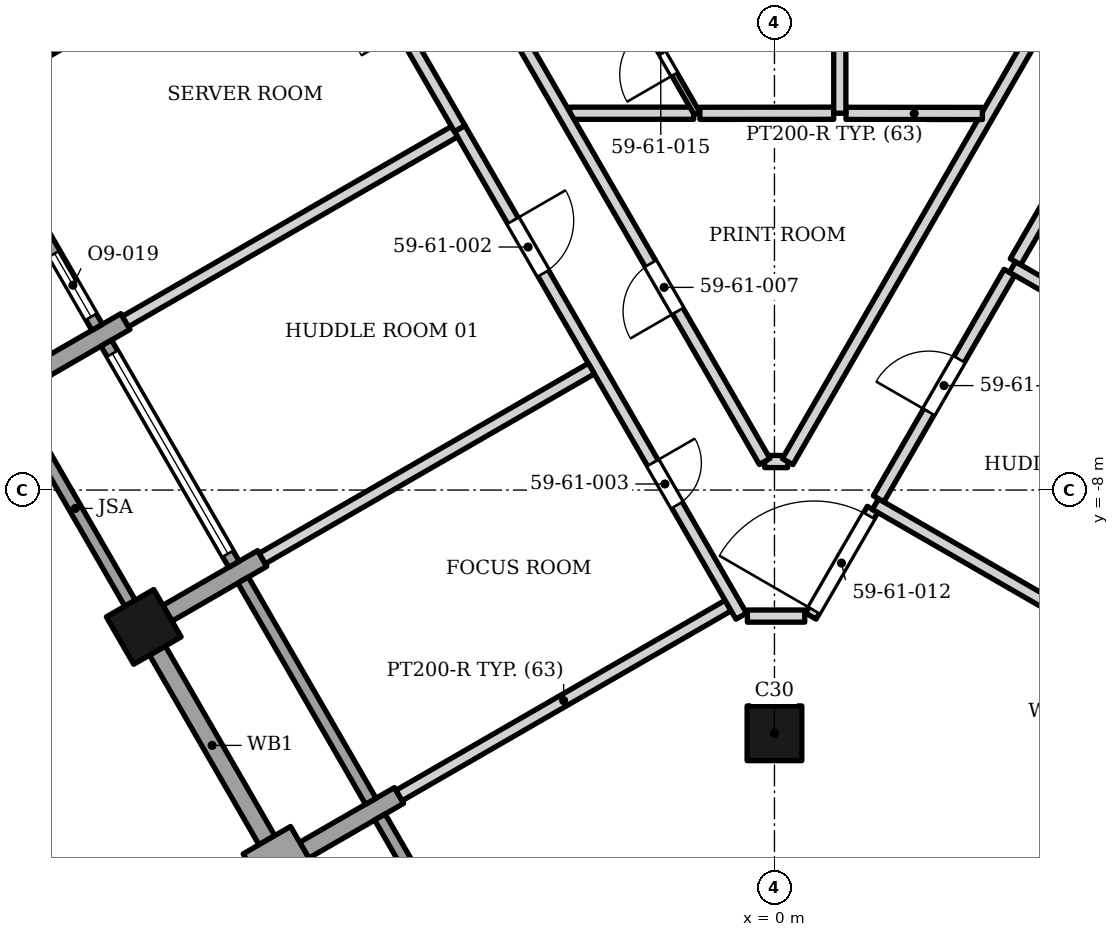
"""IFC4 building model, lengths in metres.
Left out: names, types, materials, properties, quantities, classifications, styles, units other than length and angle.
Written with IfcOpenShell. Run it as: python <this file> out.ifc"""

import sys

from ifc_helpers import new_model, si_unit, direction, frame, frame_2d, origin, origin_2d, place, context, subcontext, project, spatial, rectangle, extrude, element, fill, save


model = new_model("IFC4")
c1 = context("Model", 3, precision=1e-05, world=origin(), true_north=direction((0.0, 1.0)))
c2 = subcontext(c1, "Body", "Model", "MODEL_VIEW")
j1 = project(units=[si_unit("LENGTHUNIT", "METRE"), si_unit("PLANEANGLEUNIT", "RADIAN")], contexts=[c1])
p1 = place(None, origin())
s1 = spatial("IfcSite", under=j1, at=p1, CompositionType="ELEMENT")
p2 = place(p1, origin())
s2 = spatial("IfcBuilding", under=s1, at=p2, CompositionType="ELEMENT")
p3 = place(p2, frame((0.0, 0.0, 248.2)))
s3 = spatial("IfcBuildingStorey", under=s2, at=p3, CompositionType="ELEMENT", Elevation=248.2)
for number, where, z_axis, x_axis in (
    (1, (0.0, -12.0, 0.0), (0.0, 0.0, 1.0), (1.0, 0.0, 0.0)),
    (2, (-10.373, -10.25, 0.0), (0.0, 0.0, 1.0), (0.5, -0.866, 0.0)),
):
    element("IfcColumn", number, at=place(p3, frame(where, z_axis=z_axis, x_axis=x_axis)), inside=s3, PredefinedType="COLUMN", context=c2, shape_type="SweptSolid", body=[
        extrude(rectangle(XDim=0.9, YDim=0.9, at=origin_2d()), origin(), (0.0, 0.0, 1.0), 3.9),
    ])
for number, where, z_axis, x_axis in (
    (3, (-12.233, -6.128, 0.0), (0.0, 0.0, 1.0), (0.866, 0.5, 0.0)),
    (4, (-9.983, -10.025, 0.0), (0.0, 0.0, 1.0), (0.866, 0.5, 0.0)),
):
    element("IfcWall", number, at=place(p3, frame(where, z_axis=z_axis, x_axis=x_axis)), inside=s3, PredefinedType="SOLIDWALL", context=c2, shape_type="SweptSolid", body=[
        extrude(rectangle(XDim=1.8, YDim=0.3, at=frame_2d((0.9, 0.0))), origin(), (0.0, 0.0, 1.0), 3.0),
    ])
p4 = place(p3, frame((-7.898, -14.537, 0.0), z_axis=(0.0, 0.0, 1.0), x_axis=(-0.499902469156, 0.866081705922, 0.0)))
e5 = element("IfcWall", 5, at=p4, inside=s3, PredefinedType="SOLIDWALL", context=c2, shape_type="SweptSolid", body=[
    extrude(rectangle(XDim=0.9, YDim=0.9, at=frame_2d((0.45, 0.0))), origin(), (0.0, 0.0, 1.0), 3.0),
])
p5 = place(p3, frame((-6.174, -13.022, 0.0), z_axis=(0.0, 0.0, 1.0), x_axis=(-0.865989075817, -0.500062916607, 0.0)))
e6 = element("IfcWall", 6, at=p5, inside=s3, PredefinedType="SOLIDWALL", context=c2, shape_type="SweptSolid", body=[
    extrude(rectangle(XDim=1.8, YDim=0.3, at=frame_2d((0.9, 0.0))), origin(), (0.0, 0.0, 1.0), 3.0),
])
p6 = place(p3, frame((-13.239, -1.686, 0.0), z_axis=(0.0, 0.0, 1.0), x_axis=(0.500002543286, -0.866023935413, 0.0)))
e7 = element("IfcWall", 7, at=p6, inside=s3, PredefinedType="ELEMENTEDWALL", context=c2, shape_type="SweptSolid", body=[
    extrude(rectangle(XDim=4.2, YDim=0.2, at=frame_2d((2.1, 0.0))), origin(), (0.0, 0.0, 1.0), 3.0),
])
p7 = place(p6, frame((0.2, 0.0, 0.45)))
e8 = element("IfcOpeningElement", 8, at=p7, cuts=e7, PredefinedType="OPENING", context=c2, shape_type="SweptSolid", body=[
    extrude(rectangle(XDim=2.4, YDim=2.25, at=frame_2d((1.2, 1.125))), frame((0.0, 0.11, 0.0), z_axis=(0.0, -1.0, 0.0), x_axis=(1.0, 0.0, 0.0)), (0.0, 0.0, 1.0), 0.22),
])
p8 = place(p6, frame((2.8, 0.0, 0.0)))
e9 = element("IfcOpeningElement", 9, at=p8, cuts=e7, PredefinedType="OPENING", context=c2, shape_type="SweptSolid", body=[
    extrude(rectangle(XDim=1.2, YDim=2.7, at=frame_2d((0.6, 1.35))), frame((0.0, 0.11, 0.0), z_axis=(0.0, -1.0, 0.0), x_axis=(1.0, 0.0, 0.0)), (0.0, 0.0, 1.0), 0.22),
])
p9 = place(p3, frame((-12.398, -6.743, 0.0), z_axis=(0.0, 0.0, 1.0), x_axis=(0.500012057535, -0.866018442252, 0.0)))
e10 = element("IfcWall", 10, at=p9, inside=s3, PredefinedType="SOLIDWALL", context=c2, shape_type="SweptSolid", body=[
    extrude(rectangle(XDim=3.6, YDim=0.2, at=frame_2d((1.8, 0.0))), origin(), (0.0, 0.0, 1.0), 3.0),
])
p10 = place(p3, frame((-10.989, -5.583, 0.0), z_axis=(0.0, 0.0, 1.0), x_axis=(0.500027713859, -0.866009402589, 0.0)))
e11 = element("IfcWall", 11, at=p10, inside=s3, PredefinedType="ELEMENTEDWALL", context=c2, shape_type="SweptSolid", body=[
    extrude(rectangle(XDim=4.2, YDim=0.2, at=frame_2d((2.1, 0.0))), origin(), (0.0, 0.0, 1.0), 3.0),
])
p11 = place(p10, frame((0.2, 0.0, 0.45)))
e12 = element("IfcOpeningElement", 12, at=p11, cuts=e11, PredefinedType="OPENING", context=c2, shape_type="SweptSolid", body=[
    extrude(rectangle(XDim=3.8, YDim=2.25, at=frame_2d((1.9, 1.125))), frame((0.0, 0.11, 0.0), z_axis=(0.0, -1.0, 0.0), x_axis=(1.0, 0.0, 0.0)), (0.0, 0.0, 1.0), 0.22),
])
p12 = place(p3, frame((-10.148, -10.64, 0.0), z_axis=(0.0, 0.0, 1.0), x_axis=(0.500012057535, -0.866018442252, 0.0)))
e13 = element("IfcWall", 13, at=p12, inside=s3, PredefinedType="SOLIDWALL", context=c2, shape_type="SweptSolid", body=[
    extrude(rectangle(XDim=3.6, YDim=0.3, at=frame_2d((1.8, 0.0))), origin(), (0.0, 0.0, 1.0), 2.95),
])
p13 = place(p3, frame((-8.739, -9.48, 0.0), z_axis=(0.0, 0.0, 1.0), x_axis=(0.500027713859, -0.866009402589, 0.0)))
e14 = element("IfcWall", 14, at=p13, inside=s3, PredefinedType="ELEMENTEDWALL", context=c2, shape_type="SweptSolid", body=[
    extrude(rectangle(XDim=4.2, YDim=0.2, at=frame_2d((2.1, 0.0))), origin(), (0.0, 0.0, 1.0), 2.95),
])
p14 = place(p3, frame((-6.489, -13.377, 0.0), z_axis=(0.0, 0.0, 1.0), x_axis=(0.500002543286, -0.866023935413, 0.0)))
e15 = element("IfcWall", 15, at=p14, inside=s3, PredefinedType="ELEMENTEDWALL", context=c2, shape_type="SweptSolid", body=[
    extrude(rectangle(XDim=4.2, YDim=0.2, at=frame_2d((2.1, 0.0))), origin(), (0.0, 0.0, 1.0), 3.0),
])
p15 = place(p3, frame((-6.174, -13.023, 0.0), z_axis=(0.0, 0.0, 1.0), x_axis=(0.866143960209, 0.499794598003, 0.0)))
e16 = element("IfcWall", 16, at=p15, inside=s3, PredefinedType="PARTITIONING", context=c2, shape_type="SweptSolid", body=[
    extrude(rectangle(XDim=6.25, YDim=0.2, at=frame_2d((3.125, 0.0))), origin(), (0.0, 0.0, 1.0), 2.884),
])
p16 = place(p3, frame((-5.177, -2.054, 0.0), z_axis=(0.0, 0.0, 1.0), x_axis=(0.499987206771, -0.866032789833, 0.0)))
e17 = element("IfcWall", 17, at=p16, inside=s3, PredefinedType="PARTITIONING", context=c2, shape_type="SweptSolid", body=[
    extrude(rectangle(XDim=9.26, YDim=0.2, at=frame_2d((4.63, 0.0))), origin(), (0.0, 0.0, 1.0), 2.884),
])
p17 = place(p16, frame((1.75, 0.0, 0.0)))
e18 = element("IfcOpeningElement", 18, at=p17, cuts=e17, PredefinedType="OPENING", context=c2, shape_type="SweptSolid", body=[
    extrude(rectangle(XDim=1.0, YDim=2.1, at=frame_2d((0.5, 1.05))), frame((0.0, 0.11, 0.0), z_axis=(0.0, -1.0, 0.0), x_axis=(1.0, 0.0, 0.0)), (0.0, 0.0, 1.0), 0.22),
])
p18 = place(p16, frame((6.35, 0.0, 0.0)))
e19 = element("IfcOpeningElement", 19, at=p18, cuts=e17, PredefinedType="OPENING", context=c2, shape_type="SweptSolid", body=[
    extrude(rectangle(XDim=0.8, YDim=2.1, at=frame_2d((0.4, 1.05))), frame((0.0, 0.11, 0.0), z_axis=(0.0, -1.0, 0.0), x_axis=(1.0, 0.0, 0.0)), (0.0, 0.0, 1.0), 0.22),
])
p19 = place(p3, frame((-0.445, -10.073, 0.0), z_axis=(0.0, 0.0, 1.0), x_axis=(1.0, 0.0, 0.0)))
e20 = element("IfcWall", 20, at=p19, inside=s3, PredefinedType="PARTITIONING", context=c2, shape_type="SweptSolid", body=[
    extrude(rectangle(XDim=0.943, YDim=0.2, at=frame_2d((0.472, 0.0))), origin(), (0.0, 0.0, 1.0), 3.73),
])
p20 = place(p3, frame((0.598, -10.073, 0.0), z_axis=(0.0, 0.0, 1.0), x_axis=(0.500670744682, 0.865637802675, 0.0)))
e21 = element("IfcWall", 21, at=p20, inside=s3, PredefinedType="PARTITIONING", context=c2, shape_type="SweptSolid", body=[
    extrude(rectangle(XDim=2.028, YDim=0.2, at=frame_2d((1.014, 0.0))), origin(), (0.0, 0.0, 1.0), 3.73),
])
p21 = place(p20, frame((0.107, 0.0, 0.0)))
e22 = element("IfcOpeningElement", 22, at=p21, cuts=e21, PredefinedType="OPENING", context=c2, shape_type="SweptSolid", body=[
    extrude(rectangle(XDim=1.8, YDim=2.4, at=frame_2d((0.9, 1.2))), frame((0.0, 0.11, 0.0), z_axis=(0.0, -1.0, 0.0), x_axis=(1.0, 0.0, 0.0)), (0.0, 0.0, 1.0), 0.22),
])
p22 = place(p3, frame((1.661, -8.231, 0.0), z_axis=(0.0, 0.0, 1.0), x_axis=(0.866162357873, -0.499762713499, 0.0)))
e23 = element("IfcWall", 23, at=p22, inside=s3, PredefinedType="PARTITIONING", context=c2, shape_type="SweptSolid", body=[
    extrude(rectangle(XDim=5.95, YDim=0.2, at=frame_2d((2.975, 0.0))), origin(), (0.0, 0.0, 1.0), 2.884),
])
p23 = place(p3, frame((-0.161, -7.53, 0.0), z_axis=(0.0, 0.0, 1.0), x_axis=(0.999986611797, -0.005174574964, 0.0)))
e24 = element("IfcWall", 24, at=p23, inside=s3, PredefinedType="PARTITIONING", context=c2, shape_type="SweptSolid", body=[
    extrude(rectangle(XDim=0.377, YDim=0.2, at=frame_2d((0.189, 0.0))), origin(), (0.0, 0.0, 1.0), 3.73),
])
p24 = place(p3, frame((0.217, -7.532, 0.0), z_axis=(0.0, 0.0, 1.0), x_axis=(0.499766665369, 0.866160077691, 0.0)))
e25 = element("IfcWall", 25, at=p24, inside=s3, PredefinedType="PARTITIONING", context=c2, shape_type="SweptSolid", body=[
    extrude(rectangle(XDim=12.588, YDim=0.2, at=frame_2d((6.294, 0.0))), origin(), (0.0, 0.0, 1.0), 2.884),
])
p25 = place(p24, frame((9.201, 0.0, 0.0)))
e26 = element("IfcOpeningElement", 26, at=p25, cuts=e25, PredefinedType="OPENING", context=c2, shape_type="SweptSolid", body=[
    extrude(rectangle(XDim=0.8, YDim=2.1, at=frame_2d((0.4, 1.05))), frame((0.0, 0.11, 0.0), z_axis=(0.0, -1.0, 0.0), x_axis=(1.0, 0.0, 0.0)), (0.0, 0.0, 1.0), 0.22),
])
p26 = place(p3, frame((-8.424, -9.125, 0.0), z_axis=(0.0, 0.0, 1.0), x_axis=(0.866180383398, 0.499731471309, 0.0)))
e27 = element("IfcWall", 27, at=p26, inside=s3, PredefinedType="PARTITIONING", context=c2, shape_type="SweptSolid", body=[
    extrude(rectangle(XDim=6.25, YDim=0.2, at=frame_2d((3.125, 0.0))), origin(), (0.0, 0.0, 1.0), 2.884),
])
p27 = place(p3, frame((1.713, -8.144, 0.0), z_axis=(0.0, 0.0, 1.0), x_axis=(0.499986217557, 0.866033360935, 0.0)))
e28 = element("IfcWall", 28, at=p27, inside=s3, PredefinedType="PARTITIONING", context=c2, shape_type="SweptSolid", body=[
    extrude(rectangle(XDim=4.3, YDim=0.2, at=frame_2d((2.15, 0.0))), origin(), (0.0, 0.0, 1.0), 3.73),
])
p28 = place(p27, frame((1.65, 0.0, 0.0)))
e29 = element("IfcOpeningElement", 29, at=p28, cuts=e28, PredefinedType="OPENING", context=c2, shape_type="SweptSolid", body=[
    extrude(rectangle(XDim=1.0, YDim=2.1, at=frame_2d((0.5, 1.05))), frame((0.0, 0.11, 0.0), z_axis=(0.0, -1.0, 0.0), x_axis=(1.0, 0.0, 0.0)), (0.0, 0.0, 1.0), 0.22),
])
p29 = place(p3, frame((3.914, -4.332, 0.0), z_axis=(0.0, 0.0, 1.0), x_axis=(0.865897075154, -0.500222205864, 0.0)))
e30 = element("IfcWall", 30, at=p29, inside=s3, PredefinedType="PARTITIONING", context=c2, shape_type="SweptSolid", body=[
    extrude(rectangle(XDim=5.948, YDim=0.2, at=frame_2d((2.974, 0.0))), origin(), (0.0, 0.0, 1.0), 2.884),
])
p30 = place(p3, frame((-10.674, -5.229, 0.0), z_axis=(0.0, 0.0, 1.0), x_axis=(0.866163474566, 0.4997607781, 0.0)))
e31 = element("IfcWall", 31, at=p30, inside=s3, PredefinedType="PARTITIONING", context=c2, shape_type="SweptSolid", body=[
    extrude(rectangle(XDim=6.25, YDim=0.2, at=frame_2d((3.125, 0.0))), origin(), (0.0, 0.0, 1.0), 3.052),
])
p31 = place(p3, frame((-7.377, 1.756, 0.0), z_axis=(0.0, 0.0, 1.0), x_axis=(0.50001224981, -0.866018331238, 0.0)))
e32 = element("IfcWall", 32, at=p31, inside=s3, PredefinedType="PARTITIONING", context=c2, shape_type="SweptSolid", body=[
    extrude(rectangle(XDim=4.4, YDim=0.2, at=frame_2d((2.2, 0.0))), origin(), (0.0, 0.0, 1.0), 3.73),
])
p32 = place(p31, frame((1.75, 0.0, 0.0)))
e33 = element("IfcOpeningElement", 33, at=p32, cuts=e32, PredefinedType="OPENING", context=c2, shape_type="SweptSolid", body=[
    extrude(rectangle(XDim=0.8, YDim=2.1, at=frame_2d((0.4, 1.05))), frame((0.0, 0.11, 0.0), z_axis=(0.0, -1.0, 0.0), x_axis=(1.0, 0.0, 0.0)), (0.0, 0.0, 1.0), 0.22),
])
p33 = place(p3, frame((1.176, -1.805, 0.0), z_axis=(0.0, 0.0, 1.0), x_axis=(0.999999709909, -0.000761697276, 0.0)))
e34 = element("IfcWall", 34, at=p33, inside=s3, PredefinedType="PARTITIONING", context=c2, shape_type="SweptSolid", body=[
    extrude(rectangle(XDim=2.244, YDim=0.2, at=frame_2d((1.122, 0.0))), origin(), (0.0, 0.0, 1.0), 3.73),
])
p34 = place(p3, frame((-3.37, -1.803, 0.0), z_axis=(0.0, 0.0, 1.0), x_axis=(0.999999992849, 0.000119588614, 0.0)))
e35 = element("IfcWall", 35, at=p34, inside=s3, PredefinedType="PARTITIONING", context=c2, shape_type="SweptSolid", body=[
    extrude(rectangle(XDim=2.042, YDim=0.2, at=frame_2d((1.021, 0.0))), origin(), (0.0, 0.0, 1.0), 3.73),
])
p35 = place(p3, frame((-1.227, -1.805, 0.0), z_axis=(0.0, 0.0, 1.0), x_axis=(0.999999698604, 0.000776397282, 0.0)))
e36 = element("IfcWall", 36, at=p35, inside=s3, PredefinedType="PARTITIONING", context=c2, shape_type="SweptSolid", body=[
    extrude(rectangle(XDim=2.201, YDim=0.2, at=frame_2d((1.101, 0.0))), origin(), (0.0, 0.0, 1.0), 3.73),
])
p36 = place(p3, frame((1.074, -1.803, 0.0), z_axis=(0.0, 0.0, 1.0), x_axis=(0.0, 1.0, 0.0)))
e37 = element("IfcWall", 37, at=p36, inside=s3, PredefinedType="PARTITIONING", context=c2, shape_type="SweptSolid", body=[
    extrude(rectangle(XDim=4.154, YDim=0.2, at=frame_2d((2.077, 0.0))), origin(), (0.0, 0.0, 1.0), 3.73),
])
p37 = place(p3, frame((-12.925, -1.331, 0.0), z_axis=(0.0, 0.0, 1.0), x_axis=(0.865907634831, 0.500203926355, 0.0)))
e38 = element("IfcWall", 38, at=p37, inside=s3, PredefinedType="PARTITIONING", context=c2, shape_type="SweptSolid", body=[
    extrude(rectangle(XDim=6.349, YDim=0.2, at=frame_2d((3.175, 0.0))), origin(), (0.0, 0.0, 1.0), 3.052),
])
p38 = place(p3, frame((3.964, -4.245, 0.0), z_axis=(0.0, 0.0, 1.0), x_axis=(0.499987977232, 0.866032345022, 0.0)))
e39 = element("IfcWall", 39, at=p38, inside=s3, PredefinedType="PARTITIONING", context=c2, shape_type="SweptSolid", body=[
    extrude(rectangle(XDim=4.298, YDim=0.2, at=frame_2d((2.149, 0.0))), origin(), (0.0, 0.0, 1.0), 2.884),
])
p39 = place(p38, frame((1.698, 0.0, 0.0)))
e40 = element("IfcOpeningElement", 40, at=p39, cuts=e39, PredefinedType="OPENING", context=c2, shape_type="SweptSolid", body=[
    extrude(rectangle(XDim=0.9, YDim=2.1, at=frame_2d((0.45, 1.05))), frame((0.0, 0.11, 0.0), z_axis=(0.0, -1.0, 0.0), x_axis=(1.0, 0.0, 0.0)), (0.0, 0.0, 1.0), 0.22),
])
p40 = place(p3, frame((-6.458, 3.37, 0.0), z_axis=(0.0, 0.0, 1.0), x_axis=(0.500262411632, -0.86587384734, 0.0)))
e41 = element("IfcWall", 41, at=p40, inside=s3, PredefinedType="PARTITIONING", context=c2, shape_type="SweptSolid", body=[
    extrude(rectangle(XDim=12.589, YDim=0.2, at=frame_2d((6.294, 0.0))), origin(), (0.0, 0.0, 1.0), 2.884),
])
p41 = place(p40, frame((8.832, 0.0, 0.0)))
e42 = element("IfcOpeningElement", 42, at=p41, cuts=e41, PredefinedType="OPENING", context=c2, shape_type="SweptSolid", body=[
    extrude(rectangle(XDim=0.9, YDim=2.1, at=frame_2d((0.45, 1.05))), frame((0.0, 0.11, 0.0), z_axis=(0.0, -1.0, 0.0), x_axis=(1.0, 0.0, 0.0)), (0.0, 0.0, 1.0), 0.22),
])
p42 = place(p40, frame((2.488, 0.0, 0.0)))
e43 = element("IfcOpeningElement", 43, at=p42, cuts=e41, PredefinedType="OPENING", context=c2, shape_type="SweptSolid", body=[
    extrude(rectangle(XDim=1.0, YDim=2.1, at=frame_2d((0.5, 1.05))), frame((0.0, 0.11, 0.0), z_axis=(0.0, -1.0, 0.0), x_axis=(1.0, 0.0, 0.0)), (0.0, 0.0, 1.0), 0.22),
])
p43 = place(p3, frame((-4.702, 4.132, 0.0), z_axis=(0.0, 0.0, 1.0), x_axis=(0.499966025771, -0.866045017926, 0.0)))
e44 = element("IfcWall", 44, at=p43, inside=s3, PredefinedType="PARTITIONING", context=c2, shape_type="SweptSolid", body=[
    extrude(rectangle(XDim=6.854, YDim=0.1, at=frame_2d((3.427, 0.0))), origin(), (0.0, 0.0, 1.0), 2.884),
])
p44 = place(p43, frame((2.688, 0.0, 0.0)))
e45 = element("IfcOpeningElement", 45, at=p44, cuts=e44, PredefinedType="OPENING", context=c2, shape_type="SweptSolid", body=[
    extrude(rectangle(XDim=0.9, YDim=2.1, at=frame_2d((0.45, 1.05))), frame((0.0, 0.06, 0.0), z_axis=(0.0, -1.0, 0.0), x_axis=(1.0, 0.0, 0.0)), (0.0, 0.0, 1.0), 0.12),
])
p45 = place(p43, frame((5.216, 0.0, 0.0)))
e46 = element("IfcOpeningElement", 46, at=p45, cuts=e44, PredefinedType="OPENING", context=c2, shape_type="SweptSolid", body=[
    extrude(rectangle(XDim=0.9, YDim=2.1, at=frame_2d((0.45, 1.05))), frame((0.0, 0.06, 0.0), z_axis=(0.0, -1.0, 0.0), x_axis=(1.0, 0.0, 0.0)), (0.0, 0.0, 1.0), 0.12),
])
p46 = place(p8, origin())
e47 = element("IfcDoor", 47, at=p46, inside=s3, OperationType="SINGLE_SWING_LEFT", PredefinedType="DOOR", context=c2, shape_type="SweptSolid", body=[
    extrude(rectangle(XDim=1.2, YDim=2.7, at=frame_2d((0.6, 1.35))), frame((0.0, 0.025, 0.0), z_axis=(0.0, -1.0, 0.0), x_axis=(1.0, 0.0, 0.0)), (0.0, 0.0, 1.0), 0.05),
])
fill(e9, e47)
p47 = place(p11, origin())
e48 = element("IfcWindow", 48, at=p47, inside=s3, PartitioningType="SINGLE_PANEL", PredefinedType="WINDOW", context=c2, shape_type="SweptSolid", body=[
    extrude(rectangle(XDim=3.8, YDim=2.25, at=frame_2d((1.9, 1.125))), frame((0.0, 0.03, 0.0), z_axis=(0.0, -1.0, 0.0), x_axis=(1.0, 0.0, 0.0)), (0.0, 0.0, 1.0), 0.06),
])
fill(e12, e48)
p48 = place(p17, origin())
e49 = element("IfcDoor", 49, at=p48, inside=s3, OperationType="SINGLE_SWING_LEFT", PredefinedType="DOOR", context=c2, shape_type="SweptSolid", body=[
    extrude(rectangle(XDim=1.0, YDim=2.1, at=frame_2d((0.5, 1.05))), frame((0.0, 0.025, 0.0), z_axis=(0.0, -1.0, 0.0), x_axis=(1.0, 0.0, 0.0)), (0.0, 0.0, 1.0), 0.05),
])
fill(e18, e49)
p49 = place(p18, origin())
e50 = element("IfcDoor", 50, at=p49, inside=s3, OperationType="SINGLE_SWING_LEFT", PredefinedType="DOOR", context=c2, shape_type="SweptSolid", body=[
    extrude(rectangle(XDim=0.8, YDim=2.1, at=frame_2d((0.4, 1.05))), frame((0.0, 0.025, 0.0), z_axis=(0.0, -1.0, 0.0), x_axis=(1.0, 0.0, 0.0)), (0.0, 0.0, 1.0), 0.05),
])
fill(e19, e50)
p50 = place(p28, origin())
e51 = element("IfcDoor", 51, at=p50, inside=s3, OperationType="SINGLE_SWING_LEFT", PredefinedType="DOOR", context=c2, shape_type="SweptSolid", body=[
    extrude(rectangle(XDim=1.0, YDim=2.1, at=frame_2d((0.5, 1.05))), frame((0.0, 0.025, 0.0), z_axis=(0.0, -1.0, 0.0), x_axis=(1.0, 0.0, 0.0)), (0.0, 0.0, 1.0), 0.05),
])
fill(e29, e51)
p51 = place(p41, origin())
e52 = element("IfcDoor", 52, at=p51, inside=s3, OperationType="SINGLE_SWING_RIGHT", PredefinedType="DOOR", context=c2, shape_type="SweptSolid", body=[
    extrude(rectangle(XDim=0.9, YDim=2.1, at=frame_2d((0.45, 1.05))), frame((0.0, 0.025, 0.0), z_axis=(0.0, -1.0, 0.0), x_axis=(1.0, 0.0, 0.0)), (0.0, 0.0, 1.0), 0.05),
])
fill(e42, e52)
p52 = place(p21, origin())
e53 = element("IfcDoor", 53, at=p52, inside=s3, OperationType="DOUBLE_DOOR_SINGLE_SWING", PredefinedType="DOOR", context=c2, shape_type="SweptSolid", body=[
    extrude(rectangle(XDim=1.8, YDim=2.4, at=frame_2d((0.9, 1.2))), frame((0.0, 0.025, 0.0), z_axis=(0.0, -1.0, 0.0), x_axis=(1.0, 0.0, 0.0)), (0.0, 0.0, 1.0), 0.05),
])
fill(e22, e53)
p53 = place(p45, origin())
e54 = element("IfcDoor", 54, at=p53, inside=s3, OperationType="SINGLE_SWING_RIGHT", PredefinedType="DOOR", context=c2, shape_type="SweptSolid", body=[
    extrude(rectangle(XDim=0.9, YDim=2.1, at=frame_2d((0.45, 1.05))), frame((0.0, 0.025, 0.0), z_axis=(0.0, -1.0, 0.0), x_axis=(1.0, 0.0, 0.0)), (0.0, 0.0, 1.0), 0.05),
])
fill(e46, e54)
save(model, sys.argv[1])
